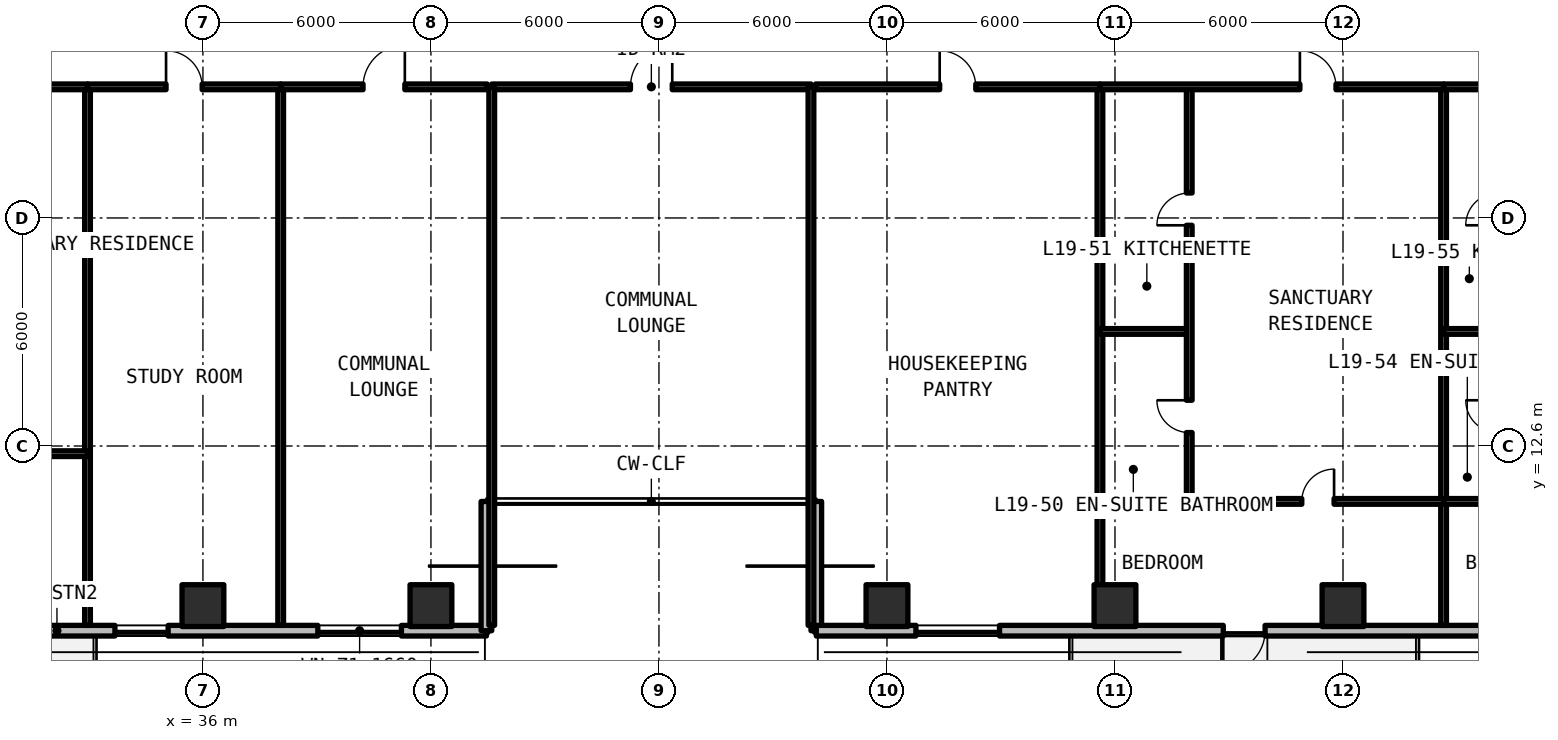
"""IFC4 building model, lengths in metres.
Left out: names, types, materials, properties, quantities, classifications, styles, units other than length and angle.
Written with IfcOpenShell. Run it as: python <this file> out.ifc"""

import sys

from ifc_helpers import new_model, si_unit, direction, frame, frame_2d, origin, origin_2d, place, context, subcontext, project, spatial, rectangle, extrude, element, fill, save


model = new_model("IFC4")
c1 = context("Model", 3, precision=1e-05, world=origin(), true_north=direction((0.0, 1.0)))
c2 = subcontext(c1, "Body", "Model", "MODEL_VIEW")
j1 = project(units=[si_unit("LENGTHUNIT", "METRE"), si_unit("PLANEANGLEUNIT", "RADIAN")], contexts=[c1])
p1 = place(None, origin())
s1 = spatial("IfcSite", under=j1, at=p1, CompositionType="ELEMENT")
p2 = place(p1, origin())
s2 = spatial("IfcBuilding", under=s1, at=p2, CompositionType="ELEMENT")
p3 = place(p2, frame((0.0, 0.0, 69.63)))
s3 = spatial("IfcBuildingStorey", under=s2, at=p3, CompositionType="ELEMENT", Elevation=69.63)
for number, where, z_axis, x_axis in (
    (1, (36.0, 8.4, 0.0), (0.0, 0.0, 1.0), (1.0, 0.0, 0.0)),
    (2, (42.0, 8.4, 0.0), (0.0, 0.0, 1.0), (1.0, 0.0, 0.0)),
    (3, (54.0, 8.4, 0.0), (0.0, 0.0, 1.0), (1.0, 0.0, 0.0)),
    (4, (60.0, 8.4, 0.0), (0.0, 0.0, 1.0), (1.0, 0.0, 0.0)),
    (5, (66.0, 8.4, 0.0), (0.0, 0.0, 1.0), (1.0, 0.0, 0.0)),
):
    element("IfcColumn", number, at=place(p3, frame(where, z_axis=z_axis, x_axis=x_axis)), inside=s3, PredefinedType="COLUMN", context=c2, shape_type="SweptSolid", body=[
        extrude(rectangle(XDim=1.1, YDim=1.1, at=origin_2d()), origin(), (0.0, 0.0, 1.0), 3.63),
    ])
p4 = place(p3, frame((20.858, 7.74, 0.0), z_axis=(0.0, 0.0, 1.0), x_axis=(1.0, 0.0, 0.0)))
e6 = element("IfcWall", 6, at=p4, inside=s3, PredefinedType="SOLIDWALL", context=c2, shape_type="SweptSolid", body=[
    extrude(rectangle(XDim=22.602, YDim=0.28, at=frame_2d((11.301, 0.0))), origin(), (0.0, 0.0, 1.0), 3.35),
])
p5 = place(p4, frame((6.192, 0.0, 0.0)))
e7 = element("IfcOpeningElement", 7, at=p5, cuts=e6, PredefinedType="OPENING", context=c2, shape_type="SweptSolid", body=[
    extrude(rectangle(XDim=1.1, YDim=2.15, at=frame_2d((0.55, 1.075))), frame((0.0, 0.15, 0.0), z_axis=(0.0, -1.0, 0.0), x_axis=(1.0, 0.0, 0.0)), (0.0, 0.0, 1.0), 0.3),
])
p6 = place(p4, frame((0.879, 0.0, 0.78)))
e8 = element("IfcOpeningElement", 8, at=p6, cuts=e6, PredefinedType="OPENING", context=c2, shape_type="SweptSolid", body=[
    extrude(rectangle(XDim=1.4, YDim=1.65, at=frame_2d((0.7, 0.825))), frame((0.0, 0.15, 0.0), z_axis=(0.0, -1.0, 0.0), x_axis=(1.0, 0.0, 0.0)), (0.0, 0.0, 1.0), 0.3),
])
p7 = place(p4, frame((12.827, 0.0, 0.78)))
e9 = element("IfcOpeningElement", 9, at=p7, cuts=e6, PredefinedType="OPENING", context=c2, shape_type="SweptSolid", body=[
    extrude(rectangle(XDim=1.4, YDim=1.65, at=frame_2d((0.7, 0.825))), frame((0.0, 0.15, 0.0), z_axis=(0.0, -1.0, 0.0), x_axis=(1.0, 0.0, 0.0)), (0.0, 0.0, 1.0), 0.3),
])
p8 = place(p4, frame((18.165, 0.0, 0.78)))
e10 = element("IfcOpeningElement", 10, at=p8, cuts=e6, PredefinedType="OPENING", context=c2, shape_type="SweptSolid", body=[
    extrude(rectangle(XDim=2.2, YDim=1.66, at=frame_2d((1.1, 0.83))), frame((0.0, 0.15, 0.0), z_axis=(0.0, -1.0, 0.0), x_axis=(1.0, 0.0, 0.0)), (0.0, 0.0, 1.0), 0.3),
])
for number, where, z_axis, x_axis in (
    (11, (43.46, 7.74, 0.0), (0.0, 0.0, 1.0), (0.0, 1.0, 0.0)),
    (12, (52.14, 11.14, 0.0), (0.0, 0.0, 1.0), (0.0, -1.0, 0.0)),
):
    element("IfcWall", number, at=place(p3, frame(where, z_axis=z_axis, x_axis=x_axis)), inside=s3, PredefinedType="SOLIDWALL", context=c2, shape_type="SweptSolid", body=[
        extrude(rectangle(XDim=3.4, YDim=0.28, at=frame_2d((1.7, 0.0))), origin(), (0.0, 0.0, 1.0), 3.35),
    ])
p9 = place(p3, frame((52.14, 7.74, 0.0), z_axis=(0.0, 0.0, 1.0), x_axis=(1.0, 0.0, 0.0)))
e13 = element("IfcWall", 13, at=p9, inside=s3, PredefinedType="SOLIDWALL", context=c2, shape_type="SweptSolid", body=[
    extrude(rectangle(XDim=44.402, YDim=0.28, at=frame_2d((22.201, 0.0))), origin(), (0.0, 0.0, 1.0), 3.35),
])
p10 = place(p9, frame((10.71, 0.0, 0.0)))
e14 = element("IfcOpeningElement", 14, at=p10, cuts=e13, PredefinedType="OPENING", context=c2, shape_type="SweptSolid", body=[
    extrude(rectangle(XDim=1.1, YDim=2.15, at=frame_2d((0.55, 1.075))), frame((0.0, 0.15, 0.0), z_axis=(0.0, -1.0, 0.0), x_axis=(1.0, 0.0, 0.0)), (0.0, 0.0, 1.0), 0.3),
])
p11 = place(p9, frame((22.31, 0.0, 0.0)))
e15 = element("IfcOpeningElement", 15, at=p11, cuts=e13, PredefinedType="OPENING", context=c2, shape_type="SweptSolid", body=[
    extrude(rectangle(XDim=1.1, YDim=2.15, at=frame_2d((0.55, 1.075))), frame((0.0, 0.15, 0.0), z_axis=(0.0, -1.0, 0.0), x_axis=(1.0, 0.0, 0.0)), (0.0, 0.0, 1.0), 0.3),
])
p12 = place(p9, frame((33.51, 0.0, 0.0)))
e16 = element("IfcOpeningElement", 16, at=p12, cuts=e13, PredefinedType="OPENING", context=c2, shape_type="SweptSolid", body=[
    extrude(rectangle(XDim=1.1, YDim=2.15, at=frame_2d((0.55, 1.075))), frame((0.0, 0.15, 0.0), z_axis=(0.0, -1.0, 0.0), x_axis=(1.0, 0.0, 0.0)), (0.0, 0.0, 1.0), 0.3),
])
p13 = place(p9, frame((2.622, 0.0, 0.78)))
e17 = element("IfcOpeningElement", 17, at=p13, cuts=e13, PredefinedType="OPENING", context=c2, shape_type="SweptSolid", body=[
    extrude(rectangle(XDim=2.2, YDim=1.66, at=frame_2d((1.1, 0.83))), frame((0.0, 0.15, 0.0), z_axis=(0.0, -1.0, 0.0), x_axis=(1.0, 0.0, 0.0)), (0.0, 0.0, 1.0), 0.3),
])
p14 = place(p9, frame((38.638, 0.0, 0.78)))
e18 = element("IfcOpeningElement", 18, at=p14, cuts=e13, PredefinedType="OPENING", context=c2, shape_type="SweptSolid", body=[
    extrude(rectangle(XDim=2.2, YDim=1.66, at=frame_2d((1.1, 0.83))), frame((0.0, 0.15, 0.0), z_axis=(0.0, -1.0, 0.0), x_axis=(1.0, 0.0, 0.0)), (0.0, 0.0, 1.0), 0.3),
])
p15 = place(p3, frame((43.6, 22.05, 0.0), z_axis=(0.0, 0.0, 1.0), x_axis=(1.0, 0.0, 0.0)))
e19 = element("IfcWall", 19, at=p15, inside=s3, PredefinedType="SOLIDWALL", context=c2, shape_type="SweptSolid", body=[
    extrude(rectangle(XDim=8.4, YDim=0.15, at=frame_2d((4.2, 0.0))), origin(), (0.0, 0.0, 1.0), 2.57),
])
p16 = place(p15, frame((3.65, 0.0, 0.0)))
e20 = element("IfcOpeningElement", 20, at=p16, cuts=e19, PredefinedType="OPENING", context=c2, shape_type="SweptSolid", body=[
    extrude(rectangle(XDim=1.1, YDim=2.15, at=frame_2d((0.55, 1.075))), frame((0.0, 0.085, 0.0), z_axis=(0.0, -1.0, 0.0), x_axis=(1.0, 0.0, 0.0)), (0.0, 0.0, 1.0), 0.17),
])
for number, where, z_axis, x_axis in (
    (21, (43.6, 7.88, 0.0), (0.0, 0.0, 1.0), (0.0, 1.0, 0.0)),
    (22, (52.0, 7.88, 0.0), (0.0, 0.0, 1.0), (0.0, 1.0, 0.0)),
    (23, (32.963, 7.88, 0.0), (0.0, 0.0, 1.0), (0.0, 1.0, 0.0)),
):
    element("IfcWall", number, at=place(p3, frame(where, z_axis=z_axis, x_axis=x_axis)), inside=s3, PredefinedType="SOLIDWALL", context=c2, shape_type="SweptSolid", body=[
        extrude(rectangle(XDim=14.17, YDim=0.15, at=frame_2d((7.085, 0.0))), origin(), (0.0, 0.0, 1.0), 2.57),
    ])
p17 = place(p3, frame((26.434, 12.398, 0.0), z_axis=(0.0, 0.0, 1.0), x_axis=(1.0, 0.0, 0.0)))
e24 = element("IfcWall", 24, at=p17, inside=s3, PredefinedType="PARTITIONING", context=c2, shape_type="SweptSolid", body=[
    extrude(rectangle(XDim=6.529, YDim=0.15, at=frame_2d((3.265, 0.0))), origin(), (0.0, 0.0, 1.0), 2.57),
])
p18 = place(p17, frame((3.703, 0.0, 0.0)))
e25 = element("IfcOpeningElement", 25, at=p18, cuts=e24, PredefinedType="OPENING", context=c2, shape_type="SweptSolid", body=[
    extrude(rectangle(XDim=0.85, YDim=2.1, at=frame_2d((0.425, 1.05))), frame((0.0, 0.085, 0.0), z_axis=(0.0, -1.0, 0.0), x_axis=(1.0, 0.0, 0.0)), (0.0, 0.0, 1.0), 0.17),
])
p19 = place(p3, frame((26.434, 22.05, 0.0), z_axis=(0.0, 0.0, 1.0), x_axis=(1.0, 0.0, 0.0)))
e26 = element("IfcWall", 26, at=p19, inside=s3, PredefinedType="SOLIDWALL", context=c2, shape_type="SweptSolid", body=[
    extrude(rectangle(XDim=6.529, YDim=0.15, at=frame_2d((3.265, 0.0))), origin(), (0.0, 0.0, 1.0), 2.57),
])
p20 = place(p19, frame((3.653, 0.0, 0.0)))
e27 = element("IfcOpeningElement", 27, at=p20, cuts=e26, PredefinedType="OPENING", context=c2, shape_type="SweptSolid", body=[
    extrude(rectangle(XDim=0.95, YDim=2.15, at=frame_2d((0.475, 1.075))), frame((0.0, 0.085, 0.0), z_axis=(0.0, -1.0, 0.0), x_axis=(1.0, 0.0, 0.0)), (0.0, 0.0, 1.0), 0.17),
])
p21 = place(p3, frame((38.046, 7.88, 0.0), z_axis=(0.0, 0.0, 1.0), x_axis=(0.0, 1.0, 0.0)))
e28 = element("IfcWall", 28, at=p21, inside=s3, PredefinedType="SOLIDWALL", context=c2, shape_type="SweptSolid", body=[
    extrude(rectangle(XDim=14.17, YDim=0.15, at=frame_2d((7.085, 0.0))), origin(), (0.0, 0.0, 1.0), 2.57),
])
p22 = place(p3, frame((32.963, 22.05, 0.0), z_axis=(0.0, 0.0, 1.0), x_axis=(1.0, 0.0, 0.0)))
e29 = element("IfcWall", 29, at=p22, inside=s3, PredefinedType="SOLIDWALL", context=c2, shape_type="SweptSolid", body=[
    extrude(rectangle(XDim=5.083, YDim=0.15, at=frame_2d((2.542, 0.0))), origin(), (0.0, 0.0, 1.0), 2.57),
])
p23 = place(p22, frame((2.067, 0.0, 0.0)))
e30 = element("IfcOpeningElement", 30, at=p23, cuts=e29, PredefinedType="OPENING", context=c2, shape_type="SweptSolid", body=[
    extrude(rectangle(XDim=0.95, YDim=2.15, at=frame_2d((0.475, 1.075))), frame((0.0, 0.085, 0.0), z_axis=(0.0, -1.0, 0.0), x_axis=(1.0, 0.0, 0.0)), (0.0, 0.0, 1.0), 0.17),
])
p24 = place(p3, frame((38.046, 22.05, 0.0), z_axis=(0.0, 0.0, 1.0), x_axis=(1.0, 0.0, 0.0)))
e31 = element("IfcWall", 31, at=p24, inside=s3, PredefinedType="SOLIDWALL", context=c2, shape_type="SweptSolid", body=[
    extrude(rectangle(XDim=5.434, YDim=0.15, at=frame_2d((2.717, 0.0))), origin(), (0.0, 0.0, 1.0), 2.57),
])
p25 = place(p24, frame((2.167, 0.0, 0.0)))
e32 = element("IfcOpeningElement", 32, at=p25, cuts=e31, PredefinedType="OPENING", context=c2, shape_type="SweptSolid", body=[
    extrude(rectangle(XDim=1.1, YDim=2.15, at=frame_2d((0.55, 1.075))), frame((0.0, 0.085, 0.0), z_axis=(0.0, -1.0, 0.0), x_axis=(1.0, 0.0, 0.0)), (0.0, 0.0, 1.0), 0.17),
])
p26 = place(p3, frame((59.604, 7.88, 0.0), z_axis=(0.0, 0.0, 1.0), x_axis=(0.0, 1.0, 0.0)))
e33 = element("IfcWall", 33, at=p26, inside=s3, PredefinedType="SOLIDWALL", context=c2, shape_type="SweptSolid", body=[
    extrude(rectangle(XDim=14.17, YDim=0.15, at=frame_2d((7.085, 0.0))), origin(), (0.0, 0.0, 1.0), 2.57),
])
p27 = place(p3, frame((52.12, 22.05, 0.0), z_axis=(0.0, 0.0, 1.0), x_axis=(1.0, 0.0, 0.0)))
e34 = element("IfcWall", 34, at=p27, inside=s3, PredefinedType="SOLIDWALL", context=c2, shape_type="SweptSolid", body=[
    extrude(rectangle(XDim=7.484, YDim=0.15, at=frame_2d((3.742, 0.0))), origin(), (0.0, 0.0, 1.0), 2.57),
])
p28 = place(p27, frame((3.267, 0.0, 0.0)))
e35 = element("IfcOpeningElement", 35, at=p28, cuts=e34, PredefinedType="OPENING", context=c2, shape_type="SweptSolid", body=[
    extrude(rectangle(XDim=0.95, YDim=2.15, at=frame_2d((0.475, 1.075))), frame((0.0, 0.085, 0.0), z_axis=(0.0, -1.0, 0.0), x_axis=(1.0, 0.0, 0.0)), (0.0, 0.0, 1.0), 0.17),
])
p29 = place(p3, frame((68.647, 7.88, 0.0), z_axis=(0.0, 0.0, 1.0), x_axis=(0.0, 1.0, 0.0)))
e36 = element("IfcWall", 36, at=p29, inside=s3, PredefinedType="SOLIDWALL", context=c2, shape_type="SweptSolid", body=[
    extrude(rectangle(XDim=14.17, YDim=0.15, at=frame_2d((7.085, 0.0))), origin(), (0.0, 0.0, 1.0), 2.57),
])
p30 = place(p3, frame((59.604, 15.615, 0.0), z_axis=(0.0, 0.0, 1.0), x_axis=(1.0, 0.0, 0.0)))
e37 = element("IfcWall", 37, at=p30, inside=s3, PredefinedType="PARTITIONING", context=c2, shape_type="SweptSolid", body=[
    extrude(rectangle(XDim=2.35, YDim=0.15, at=frame_2d((1.175, 0.0))), origin(), (0.0, 0.0, 1.0), 2.57),
])
p31 = place(p3, frame((61.954, 11.142, 0.0), z_axis=(0.0, 0.0, 1.0), x_axis=(0.0, 1.0, 0.0)))
e38 = element("IfcWall", 38, at=p31, inside=s3, PredefinedType="PARTITIONING", context=c2, shape_type="SweptSolid", body=[
    extrude(rectangle(XDim=10.908, YDim=0.15, at=frame_2d((5.454, 0.0))), origin(), (0.0, 0.0, 1.0), 2.57),
])
p32 = place(p31, frame((1.811, 0.0, 0.0)))
e39 = element("IfcOpeningElement", 39, at=p32, cuts=e38, PredefinedType="OPENING", context=c2, shape_type="SweptSolid", body=[
    extrude(rectangle(XDim=0.85, YDim=2.1, at=frame_2d((0.425, 1.05))), frame((0.0, 0.085, 0.0), z_axis=(0.0, -1.0, 0.0), x_axis=(1.0, 0.0, 0.0)), (0.0, 0.0, 1.0), 0.17),
])
p33 = place(p31, frame((7.265, 0.0, 0.0)))
e40 = element("IfcOpeningElement", 40, at=p33, cuts=e38, PredefinedType="OPENING", context=c2, shape_type="SweptSolid", body=[
    extrude(rectangle(XDim=0.85, YDim=2.1, at=frame_2d((0.425, 1.05))), frame((0.0, 0.085, 0.0), z_axis=(0.0, -1.0, 0.0), x_axis=(1.0, 0.0, 0.0)), (0.0, 0.0, 1.0), 0.17),
])
p34 = place(p3, frame((59.604, 11.142, 0.0), z_axis=(0.0, 0.0, 1.0), x_axis=(1.0, 0.0, 0.0)))
e41 = element("IfcWall", 41, at=p34, inside=s3, PredefinedType="PARTITIONING", context=c2, shape_type="SweptSolid", body=[
    extrude(rectangle(XDim=9.043, YDim=0.15, at=frame_2d((4.521, 0.0))), origin(), (0.0, 0.0, 1.0), 2.57),
])
p35 = place(p34, frame((5.312, 0.0, 0.0)))
e42 = element("IfcOpeningElement", 42, at=p35, cuts=e41, PredefinedType="OPENING", context=c2, shape_type="SweptSolid", body=[
    extrude(rectangle(XDim=0.85, YDim=2.1, at=frame_2d((0.425, 1.05))), frame((0.0, 0.085, 0.0), z_axis=(0.0, -1.0, 0.0), x_axis=(1.0, 0.0, 0.0)), (0.0, 0.0, 1.0), 0.17),
])
p36 = place(p3, frame((59.604, 22.05, 0.0), z_axis=(0.0, 0.0, 1.0), x_axis=(1.0, 0.0, 0.0)))
e43 = element("IfcWall", 43, at=p36, inside=s3, PredefinedType="SOLIDWALL", context=c2, shape_type="SweptSolid", body=[
    extrude(rectangle(XDim=9.043, YDim=0.15, at=frame_2d((4.521, 0.0))), origin(), (0.0, 0.0, 1.0), 2.57),
])
p37 = place(p36, frame((5.262, 0.0, 0.0)))
e44 = element("IfcOpeningElement", 44, at=p37, cuts=e43, PredefinedType="OPENING", context=c2, shape_type="SweptSolid", body=[
    extrude(rectangle(XDim=0.95, YDim=2.15, at=frame_2d((0.475, 1.075))), frame((0.0, 0.085, 0.0), z_axis=(0.0, -1.0, 0.0), x_axis=(1.0, 0.0, 0.0)), (0.0, 0.0, 1.0), 0.17),
])
p38 = place(p3, frame((68.647, 15.615, 0.0), z_axis=(0.0, 0.0, 1.0), x_axis=(1.0, 0.0, 0.0)))
e45 = element("IfcWall", 45, at=p38, inside=s3, PredefinedType="PARTITIONING", context=c2, shape_type="SweptSolid", body=[
    extrude(rectangle(XDim=1.433, YDim=0.15, at=frame_2d((0.717, 0.0))), origin(), (0.0, 0.0, 1.0), 2.57),
])
p39 = place(p3, frame((68.647, 11.142, 0.0), z_axis=(0.0, 0.0, 1.0), x_axis=(1.0, 0.0, 0.0)))
e46 = element("IfcWall", 46, at=p39, inside=s3, PredefinedType="PARTITIONING", context=c2, shape_type="SweptSolid", body=[
    extrude(rectangle(XDim=9.043, YDim=0.15, at=frame_2d((4.521, 0.0))), origin(), (0.0, 0.0, 1.0), 2.57),
])
p40 = place(p39, frame((4.853, 0.0, 0.0)))
e47 = element("IfcOpeningElement", 47, at=p40, cuts=e46, PredefinedType="OPENING", context=c2, shape_type="SweptSolid", body=[
    extrude(rectangle(XDim=0.85, YDim=2.1, at=frame_2d((0.425, 1.05))), frame((0.0, 0.085, 0.0), z_axis=(0.0, -1.0, 0.0), x_axis=(1.0, 0.0, 0.0)), (0.0, 0.0, 1.0), 0.17),
])
p41 = place(p3, frame((68.647, 22.05, 0.0), z_axis=(0.0, 0.0, 1.0), x_axis=(1.0, 0.0, 0.0)))
e48 = element("IfcWall", 48, at=p41, inside=s3, PredefinedType="SOLIDWALL", context=c2, shape_type="SweptSolid", body=[
    extrude(rectangle(XDim=9.043, YDim=0.15, at=frame_2d((4.521, 0.0))), origin(), (0.0, 0.0, 1.0), 2.57),
])
p42 = place(p41, frame((4.803, 0.0, 0.0)))
e49 = element("IfcOpeningElement", 49, at=p42, cuts=e48, PredefinedType="OPENING", context=c2, shape_type="SweptSolid", body=[
    extrude(rectangle(XDim=0.95, YDim=2.15, at=frame_2d((0.475, 1.075))), frame((0.0, 0.085, 0.0), z_axis=(0.0, -1.0, 0.0), x_axis=(1.0, 0.0, 0.0)), (0.0, 0.0, 1.0), 0.17),
])
p43 = place(p7, origin())
e50 = element("IfcWindow", 50, at=p43, inside=s3, PartitioningType="SINGLE_PANEL", PredefinedType="WINDOW", context=c2, shape_type="SweptSolid", body=[
    extrude(rectangle(XDim=1.4, YDim=1.65, at=frame_2d((0.7, 0.825))), frame((0.0, 0.03, 0.0), z_axis=(0.0, -1.0, 0.0), x_axis=(1.0, 0.0, 0.0)), (0.0, 0.0, 1.0), 0.06),
])
fill(e9, e50)
p44 = place(p8, origin())
e51 = element("IfcWindow", 51, at=p44, inside=s3, PartitioningType="SINGLE_PANEL", PredefinedType="WINDOW", context=c2, shape_type="SweptSolid", body=[
    extrude(rectangle(XDim=2.2, YDim=1.66, at=frame_2d((1.1, 0.83))), frame((0.0, 0.03, 0.0), z_axis=(0.0, -1.0, 0.0), x_axis=(1.0, 0.0, 0.0)), (0.0, 0.0, 1.0), 0.06),
])
fill(e10, e51)
p45 = place(p10, frame((1.1, 0.0, 0.0), z_axis=(0.0, 0.0, 1.0), x_axis=(-1.0, 0.0, 0.0)))
e52 = element("IfcDoor", 52, at=p45, inside=s3, OperationType="SINGLE_SWING_LEFT", PredefinedType="DOOR", context=c2, shape_type="SweptSolid", body=[
    extrude(rectangle(XDim=1.1, YDim=2.15, at=frame_2d((0.55, 1.075))), frame((0.0, 0.025, 0.0), z_axis=(0.0, -1.0, 0.0), x_axis=(1.0, 0.0, 0.0)), (0.0, 0.0, 1.0), 0.05),
])
fill(e14, e52)
p46 = place(p13, origin())
e53 = element("IfcWindow", 53, at=p46, inside=s3, PartitioningType="SINGLE_PANEL", PredefinedType="WINDOW", context=c2, shape_type="SweptSolid", body=[
    extrude(rectangle(XDim=2.2, YDim=1.66, at=frame_2d((1.1, 0.83))), frame((0.0, 0.03, 0.0), z_axis=(0.0, -1.0, 0.0), x_axis=(1.0, 0.0, 0.0)), (0.0, 0.0, 1.0), 0.06),
])
fill(e17, e53)
p47 = place(p16, origin())
e54 = element("IfcDoor", 54, at=p47, inside=s3, OperationType="SINGLE_SWING_RIGHT", PredefinedType="DOOR", context=c2, shape_type="SweptSolid", body=[
    extrude(rectangle(XDim=1.1, YDim=2.15, at=frame_2d((0.55, 1.075))), frame((0.0, 0.025, 0.0), z_axis=(0.0, -1.0, 0.0), x_axis=(1.0, 0.0, 0.0)), (0.0, 0.0, 1.0), 0.05),
])
fill(e20, e54)
p48 = place(p23, origin())
e55 = element("IfcDoor", 55, at=p48, inside=s3, OperationType="SINGLE_SWING_LEFT", PredefinedType="DOOR", context=c2, shape_type="SweptSolid", body=[
    extrude(rectangle(XDim=0.95, YDim=2.15, at=frame_2d((0.475, 1.075))), frame((0.0, 0.025, 0.0), z_axis=(0.0, -1.0, 0.0), x_axis=(1.0, 0.0, 0.0)), (0.0, 0.0, 1.0), 0.05),
])
fill(e30, e55)
p49 = place(p25, origin())
e56 = element("IfcDoor", 56, at=p49, inside=s3, OperationType="SINGLE_SWING_RIGHT", PredefinedType="DOOR", context=c2, shape_type="SweptSolid", body=[
    extrude(rectangle(XDim=1.1, YDim=2.15, at=frame_2d((0.55, 1.075))), frame((0.0, 0.025, 0.0), z_axis=(0.0, -1.0, 0.0), x_axis=(1.0, 0.0, 0.0)), (0.0, 0.0, 1.0), 0.05),
])
fill(e32, e56)
p50 = place(p28, origin())
e57 = element("IfcDoor", 57, at=p50, inside=s3, OperationType="SINGLE_SWING_LEFT", PredefinedType="DOOR", context=c2, shape_type="SweptSolid", body=[
    extrude(rectangle(XDim=0.95, YDim=2.15, at=frame_2d((0.475, 1.075))), frame((0.0, 0.025, 0.0), z_axis=(0.0, -1.0, 0.0), x_axis=(1.0, 0.0, 0.0)), (0.0, 0.0, 1.0), 0.05),
])
fill(e35, e57)
p51 = place(p32, origin())
e58 = element("IfcDoor", 58, at=p51, inside=s3, OperationType="SINGLE_SWING_RIGHT", PredefinedType="DOOR", context=c2, shape_type="SweptSolid", body=[
    extrude(rectangle(XDim=0.85, YDim=2.1, at=frame_2d((0.425, 1.05))), frame((0.0, 0.025, 0.0), z_axis=(0.0, -1.0, 0.0), x_axis=(1.0, 0.0, 0.0)), (0.0, 0.0, 1.0), 0.05),
])
fill(e39, e58)
p52 = place(p33, origin())
e59 = element("IfcDoor", 59, at=p52, inside=s3, OperationType="SINGLE_SWING_LEFT", PredefinedType="DOOR", context=c2, shape_type="SweptSolid", body=[
    extrude(rectangle(XDim=0.85, YDim=2.1, at=frame_2d((0.425, 1.05))), frame((0.0, 0.025, 0.0), z_axis=(0.0, -1.0, 0.0), x_axis=(1.0, 0.0, 0.0)), (0.0, 0.0, 1.0), 0.05),
])
fill(e40, e59)
p53 = place(p35, origin())
e60 = element("IfcDoor", 60, at=p53, inside=s3, OperationType="SINGLE_SWING_RIGHT", PredefinedType="DOOR", context=c2, shape_type="SweptSolid", body=[
    extrude(rectangle(XDim=0.85, YDim=2.1, at=frame_2d((0.425, 1.05))), frame((0.0, 0.025, 0.0), z_axis=(0.0, -1.0, 0.0), x_axis=(1.0, 0.0, 0.0)), (0.0, 0.0, 1.0), 0.05),
])
fill(e42, e60)
p54 = place(p37, origin())
e61 = element("IfcDoor", 61, at=p54, inside=s3, OperationType="SINGLE_SWING_LEFT", PredefinedType="DOOR", context=c2, shape_type="SweptSolid", body=[
    extrude(rectangle(XDim=0.95, YDim=2.15, at=frame_2d((0.475, 1.075))), frame((0.0, 0.025, 0.0), z_axis=(0.0, -1.0, 0.0), x_axis=(1.0, 0.0, 0.0)), (0.0, 0.0, 1.0), 0.05),
])
fill(e44, e61)
save(model, sys.argv[1])
